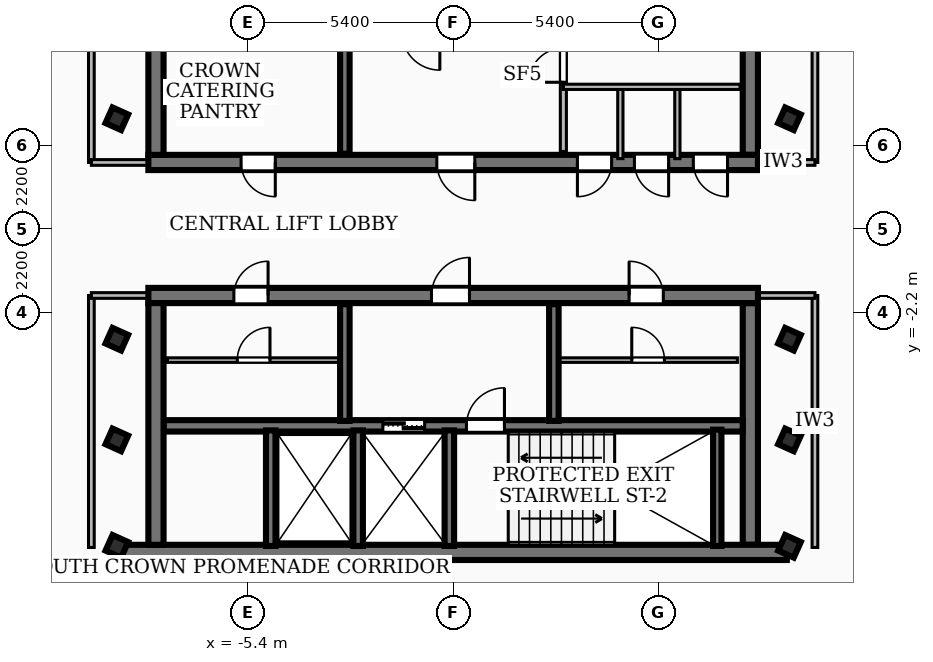
"""IFC4 building model, lengths in metres.
Left out: names, types, materials, properties, quantities, classifications, styles, units other than length and angle.
Written with IfcOpenShell. Run it as: python <this file> out.ifc"""

import sys

from ifc_helpers import new_model, si_unit, direction, frame, frame_2d, origin, origin_2d, place, context, subcontext, project, spatial, rectangle, hollow_rectangle, extrude, element, fill, save


model = new_model("IFC4")
c1 = context("Model", 3, precision=1e-05, world=origin(), true_north=direction((0.0, 1.0)))
c2 = subcontext(c1, "Body", "Model", "MODEL_VIEW")
j1 = project(units=[si_unit("LENGTHUNIT", "METRE"), si_unit("PLANEANGLEUNIT", "RADIAN")], contexts=[c1])
p1 = place(None, origin())
s1 = spatial("IfcSite", under=j1, at=p1, CompositionType="ELEMENT")
p2 = place(p1, origin())
s2 = spatial("IfcBuilding", under=s1, at=p2, CompositionType="ELEMENT")
p3 = place(p2, frame((0.0, 0.0, 297.54)))
s3 = spatial("IfcBuildingStorey", under=s2, at=p3, CompositionType="ELEMENT", Elevation=297.54)
p4 = place(p3, frame((8.02, 1.75, 0.0), z_axis=(0.0, 0.0, 1.0), x_axis=(-1.0, 0.0, 0.0)))
e1 = element("IfcWall", 1, at=p4, inside=s3, PredefinedType="SHEAR", context=c2, shape_type="SweptSolid", body=[
    extrude(rectangle(XDim=16.04, YDim=0.4, at=frame_2d((8.02, 0.0))), origin(), (0.0, 0.0, 1.0), 3.84),
])
p5 = place(p4, frame((7.45, 0.0, 0.0)))
e2 = element("IfcOpeningElement", 2, at=p5, cuts=e1, PredefinedType="OPENING", context=c2, shape_type="SweptSolid", body=[
    extrude(rectangle(XDim=1.0, YDim=2.1, at=frame_2d((0.5, 1.05))), frame((0.0, 0.21, 0.0), z_axis=(0.0, -1.0, 0.0), x_axis=(1.0, 0.0, 0.0)), (0.0, 0.0, 1.0), 0.42),
])
p6 = place(p4, frame((12.7, 0.0, 0.0)))
e3 = element("IfcOpeningElement", 3, at=p6, cuts=e1, PredefinedType="OPENING", context=c2, shape_type="SweptSolid", body=[
    extrude(rectangle(XDim=0.9, YDim=2.06, at=frame_2d((0.45, 1.03))), frame((0.0, 0.21, 0.0), z_axis=(0.0, -1.0, 0.0), x_axis=(1.0, 0.0, 0.0)), (0.0, 0.0, 1.0), 0.42),
])
p7 = place(p4, frame((3.85, 0.0, 0.0)))
e4 = element("IfcOpeningElement", 4, at=p7, cuts=e1, PredefinedType="OPENING", context=c2, shape_type="SweptSolid", body=[
    extrude(rectangle(XDim=0.9, YDim=2.06, at=frame_2d((0.45, 1.03))), frame((0.0, 0.21, 0.0), z_axis=(0.0, -1.0, 0.0), x_axis=(1.0, 0.0, 0.0)), (0.0, 0.0, 1.0), 0.42),
])
p8 = place(p4, frame((2.35, 0.0, 0.0)))
e5 = element("IfcOpeningElement", 5, at=p8, cuts=e1, PredefinedType="OPENING", context=c2, shape_type="SweptSolid", body=[
    extrude(rectangle(XDim=0.9, YDim=2.06, at=frame_2d((0.45, 1.03))), frame((0.0, 0.21, 0.0), z_axis=(0.0, -1.0, 0.0), x_axis=(1.0, 0.0, 0.0)), (0.0, 0.0, 1.0), 0.42),
])
p9 = place(p4, frame((0.8, 0.0, 0.0)))
e6 = element("IfcOpeningElement", 6, at=p9, cuts=e1, PredefinedType="OPENING", context=c2, shape_type="SweptSolid", body=[
    extrude(rectangle(XDim=0.9, YDim=2.06, at=frame_2d((0.45, 1.03))), frame((0.0, 0.21, 0.0), z_axis=(0.0, -1.0, 0.0), x_axis=(1.0, 0.0, 0.0)), (0.0, 0.0, 1.0), 0.42),
])
for number, where, z_axis, x_axis in (
    (7, (-7.82, 1.95, 0.0), (0.0, 0.0, 1.0), (0.0, 1.0, 0.0)),
    (8, (7.82, 8.31, 0.0), (0.0, 0.0, 1.0), (0.0, -1.0, 0.0)),
):
    element("IfcWall", number, at=place(p3, frame(where, z_axis=z_axis, x_axis=x_axis)), inside=s3, PredefinedType="SHEAR", context=c2, shape_type="SweptSolid", body=[
        extrude(rectangle(XDim=6.36, YDim=0.4, at=frame_2d((3.18, 0.0))), origin(), (0.0, 0.0, 1.0), 3.84),
    ])
p10 = place(p3, frame((8.78, -8.51, 0.0), z_axis=(0.0, 0.0, 1.0), x_axis=(-1.0, 0.0, 0.0)))
e9 = element("IfcWall", 9, at=p10, inside=s3, PredefinedType="SHEAR", context=c2, shape_type="SweptSolid", body=[
    extrude(rectangle(XDim=17.56, YDim=0.4, at=frame_2d((8.78, 0.0))), origin(), (0.0, 0.0, 1.0), 3.84),
])
p11 = place(p3, frame((-8.02, -1.75, 0.0), z_axis=(0.0, 0.0, 1.0), x_axis=(1.0, 0.0, 0.0)))
e10 = element("IfcWall", 10, at=p11, inside=s3, PredefinedType="SHEAR", context=c2, shape_type="SweptSolid", body=[
    extrude(rectangle(XDim=16.04, YDim=0.4, at=frame_2d((8.02, 0.0))), origin(), (0.0, 0.0, 1.0), 3.84),
])
p12 = place(p11, frame((7.45, 0.0, 0.0)))
e11 = element("IfcOpeningElement", 11, at=p12, cuts=e10, PredefinedType="OPENING", context=c2, shape_type="SweptSolid", body=[
    extrude(rectangle(XDim=1.0, YDim=2.1, at=frame_2d((0.5, 1.05))), frame((0.0, 0.21, 0.0), z_axis=(0.0, -1.0, 0.0), x_axis=(1.0, 0.0, 0.0)), (0.0, 0.0, 1.0), 0.42),
])
p13 = place(p11, frame((12.65, 0.0, 0.0)))
e12 = element("IfcOpeningElement", 12, at=p13, cuts=e10, PredefinedType="OPENING", context=c2, shape_type="SweptSolid", body=[
    extrude(rectangle(XDim=0.9, YDim=2.06, at=frame_2d((0.45, 1.03))), frame((0.0, 0.21, 0.0), z_axis=(0.0, -1.0, 0.0), x_axis=(1.0, 0.0, 0.0)), (0.0, 0.0, 1.0), 0.42),
])
p14 = place(p11, frame((2.25, 0.0, 0.0)))
e13 = element("IfcOpeningElement", 13, at=p14, cuts=e10, PredefinedType="OPENING", context=c2, shape_type="SweptSolid", body=[
    extrude(rectangle(XDim=0.9, YDim=2.06, at=frame_2d((0.45, 1.03))), frame((0.0, 0.21, 0.0), z_axis=(0.0, -1.0, 0.0), x_axis=(1.0, 0.0, 0.0)), (0.0, 0.0, 1.0), 0.42),
])
for number, where, z_axis, x_axis in (
    (14, (-7.82, -8.31, 0.0), (0.0, 0.0, 1.0), (0.0, 1.0, 0.0)),
    (15, (7.82, -1.95, 0.0), (0.0, 0.0, 1.0), (0.0, -1.0, 0.0)),
):
    element("IfcWall", number, at=place(p3, frame(where, z_axis=z_axis, x_axis=x_axis)), inside=s3, PredefinedType="SHEAR", context=c2, shape_type="SweptSolid", body=[
        extrude(rectangle(XDim=6.36, YDim=0.4, at=frame_2d((3.18, 0.0))), origin(), (0.0, 0.0, 1.0), 3.84),
    ])
p15 = place(p3, frame((-7.62, -5.18, 0.0), z_axis=(0.0, 0.0, 1.0), x_axis=(1.0, 0.0, 0.0)))
e16 = element("IfcWall", 16, at=p15, inside=s3, PredefinedType="SOLIDWALL", context=c2, shape_type="SweptSolid", body=[
    extrude(rectangle(XDim=15.24, YDim=0.3, at=frame_2d((7.62, 0.0))), origin(), (0.0, 0.0, 1.0), 3.84),
])
p16 = place(p15, frame((5.77, 0.0, 0.0)))
e17 = element("IfcOpeningElement", 17, at=p16, cuts=e16, PredefinedType="OPENING", context=c2, shape_type="SweptSolid", body=[
    extrude(rectangle(XDim=1.1, YDim=2.15, at=frame_2d((0.55, 1.075))), frame((0.0, 0.16, 0.0), z_axis=(0.0, -1.0, 0.0), x_axis=(1.0, 0.0, 0.0)), (0.0, 0.0, 1.0), 0.32),
])
p17 = place(p15, frame((7.97, 0.0, 0.0)))
e18 = element("IfcOpeningElement", 18, at=p17, cuts=e16, PredefinedType="OPENING", context=c2, shape_type="SweptSolid", body=[
    extrude(rectangle(XDim=1.0, YDim=2.1, at=frame_2d((0.5, 1.05))), frame((0.0, 0.16, 0.0), z_axis=(0.0, -1.0, 0.0), x_axis=(1.0, 0.0, 0.0)), (0.0, 0.0, 1.0), 0.32),
])
p18 = place(p3, frame((6.95, -8.34, 0.0), z_axis=(0.0, 0.0, 1.0), x_axis=(0.0, 1.0, 0.0)))
e19 = element("IfcWall", 19, at=p18, inside=s3, PredefinedType="SOLIDWALL", context=c2, shape_type="SweptSolid", body=[
    extrude(rectangle(XDim=3.06, YDim=0.22, at=frame_2d((1.53, 0.0))), origin(), (0.0, 0.0, 1.0), 3.84),
])
p19 = place(p3, frame((-2.85, 1.98, 0.0), z_axis=(0.0, 0.0, 1.0), x_axis=(0.0, 1.0, 0.0)))
e20 = element("IfcWall", 20, at=p19, inside=s3, PredefinedType="SOLIDWALL", context=c2, shape_type="SweptSolid", body=[
    extrude(rectangle(XDim=3.07, YDim=0.25, at=frame_2d((1.535, 0.0))), origin(), (0.0, 0.0, 1.0), 3.84),
])
for number, where, z_axis, x_axis in (
    (21, (-0.1, -8.34, 0.0), (0.0, 0.0, 1.0), (0.0, 1.0, 0.0)),
    (22, (-2.5, -8.34, 0.0), (0.0, 0.0, 1.0), (0.0, 1.0, 0.0)),
    (23, (-4.8, -8.34, 0.0), (0.0, 0.0, 1.0), (0.0, 1.0, 0.0)),
):
    element("IfcWall", number, at=place(p3, frame(where, z_axis=z_axis, x_axis=x_axis)), inside=s3, PredefinedType="SOLIDWALL", context=c2, shape_type="SweptSolid", body=[
        extrude(rectangle(XDim=3.04, YDim=0.25, at=frame_2d((1.52, 0.0))), origin(), (0.0, 0.0, 1.0), 3.84),
    ])
for number, where, z_axis, x_axis in (
    (24, (-2.85, -5.05, 0.0), (0.0, 0.0, 1.0), (0.0, 1.0, 0.0)),
    (25, (2.65, -5.05, 0.0), (0.0, 0.0, 1.0), (0.0, 1.0, 0.0)),
):
    element("IfcWall", number, at=place(p3, frame(where, z_axis=z_axis, x_axis=x_axis)), inside=s3, PredefinedType="SOLIDWALL", context=c2, shape_type="SweptSolid", body=[
        extrude(rectangle(XDim=3.07, YDim=0.25, at=frame_2d((1.535, 0.0))), origin(), (0.0, 0.0, 1.0), 3.84),
    ])
for number, where, z_axis, x_axis in (
    (26, (-8.85, -5.55, 0.0), (0.0, 0.0, 1.0), (0.411, 0.912, 0.0)),
    (27, (-8.85, -2.9, 0.0), (0.0, 0.0, 1.0), (0.411, 0.912, 0.0)),
    (28, (-8.85, 2.9, 0.0), (0.0, 0.0, 1.0), (0.411, 0.912, 0.0)),
    (29, (8.85, -5.55, 0.0), (0.0, 0.0, 1.0), (0.411, 0.912, 0.0)),
    (30, (8.85, -2.9, 0.0), (0.0, 0.0, 1.0), (0.411, 0.912, 0.0)),
    (31, (8.85, 2.9, 0.0), (0.0, 0.0, 1.0), (0.411, 0.912, 0.0)),
    (32, (8.85, -8.35, 0.0), (0.0, 0.0, 1.0), (0.411, 0.912, 0.0)),
    (33, (-8.85, -8.35, 0.0), (0.0, 0.0, 1.0), (0.411, 0.912, 0.0)),
):
    element("IfcColumn", number, at=place(p3, frame(where, z_axis=z_axis, x_axis=x_axis)), inside=s3, PredefinedType="COLUMN", context=c2, shape_type="SweptSolid", body=[
        extrude(hollow_rectangle(XDim=0.45, YDim=0.45, WallThickness=0.022, at=origin_2d()), origin(), (0.0, 0.0, 1.0), 4.14),
    ])
p20 = place(p3, frame((6.434, -18.744, 0.0), z_axis=(0.0, 0.0, 1.0), x_axis=(-0.911837784954, 0.410550671574, 0.0)))
e34 = element("IfcWall", 34, at=p20, inside=s3, PredefinedType="SOLIDWALL", context=c2, shape_type="SweptSolid", body=[
    extrude(rectangle(XDim=27.125, YDim=0.2, at=frame_2d((13.562, 0.0))), origin(), (0.0, 0.0, 1.0), 3.84),
])
p21 = place(p3, frame((2.9, 2.04, 0.0), z_axis=(0.0, 0.0, 1.0), x_axis=(0.0, 1.0, 0.0)))
e35 = element("IfcWall", 35, at=p21, inside=s3, PredefinedType="PARTITIONING", context=c2, shape_type="SweptSolid", body=[
    extrude(rectangle(XDim=2.94, YDim=0.16, at=frame_2d((1.47, 0.0))), origin(), (0.0, 0.0, 1.0), 3.07),
])
p22 = place(p21, frame((1.82, 0.0, 0.0)))
e36 = element("IfcOpeningElement", 36, at=p22, cuts=e35, PredefinedType="OPENING", context=c2, shape_type="SweptSolid", body=[
    extrude(rectangle(XDim=0.9, YDim=2.06, at=frame_2d((0.45, 1.03))), frame((0.0, 0.09, 0.0), z_axis=(0.0, -1.0, 0.0), x_axis=(1.0, 0.0, 0.0)), (0.0, 0.0, 1.0), 0.18),
])
p23 = place(p3, frame((2.9, 3.74, 0.0), z_axis=(0.0, 0.0, 1.0), x_axis=(1.0, 0.0, 0.0)))
e37 = element("IfcWall", 37, at=p23, inside=s3, PredefinedType="PARTITIONING", context=c2, shape_type="SweptSolid", body=[
    extrude(rectangle(XDim=4.65, YDim=0.138, at=frame_2d((2.325, 0.0))), origin(), (0.0, 0.0, 1.0), 3.84),
])
p24 = place(p3, frame((2.8, -3.45, 0.0), z_axis=(0.0, 0.0, 1.0), x_axis=(1.0, 0.0, 0.0)))
e38 = element("IfcWall", 38, at=p24, inside=s3, PredefinedType="PARTITIONING", context=c2, shape_type="SweptSolid", body=[
    extrude(rectangle(XDim=4.68, YDim=0.12, at=frame_2d((2.34, 0.0))), origin(), (0.0, 0.0, 1.0), 3.84),
])
p25 = place(p24, frame((1.9, 0.0, 0.0)))
e39 = element("IfcOpeningElement", 39, at=p25, cuts=e38, PredefinedType="OPENING", context=c2, shape_type="SweptSolid", body=[
    extrude(rectangle(XDim=0.86, YDim=2.04, at=frame_2d((0.43, 1.02))), frame((0.0, 0.07, 0.0), z_axis=(0.0, -1.0, 0.0), x_axis=(1.0, 0.0, 0.0)), (0.0, 0.0, 1.0), 0.14),
])
p26 = place(p3, frame((-7.52, -3.45, 0.0), z_axis=(0.0, 0.0, 1.0), x_axis=(1.0, 0.0, 0.0)))
e40 = element("IfcWall", 40, at=p26, inside=s3, PredefinedType="PARTITIONING", context=c2, shape_type="SweptSolid", body=[
    extrude(rectangle(XDim=4.54, YDim=0.12, at=frame_2d((2.27, 0.0))), origin(), (0.0, 0.0, 1.0), 3.21),
])
p27 = place(p26, frame((1.84, 0.0, 0.0)))
e41 = element("IfcOpeningElement", 41, at=p27, cuts=e40, PredefinedType="OPENING", context=c2, shape_type="SweptSolid", body=[
    extrude(rectangle(XDim=0.86, YDim=2.04, at=frame_2d((0.43, 1.02))), frame((0.0, 0.07, 0.0), z_axis=(0.0, -1.0, 0.0), x_axis=(1.0, 0.0, 0.0)), (0.0, 0.0, 1.0), 0.14),
])
for number, where, z_axis, x_axis in (
    (42, (4.4, 1.85, 0.0), (0.0, 0.0, 1.0), (0.0, 1.0, 0.0)),
    (43, (5.9, 1.85, 0.0), (0.0, 0.0, 1.0), (0.0, 1.0, 0.0)),
):
    element("IfcWall", number, at=place(p3, frame(where, z_axis=z_axis, x_axis=x_axis)), inside=s3, PredefinedType="PARTITIONING", context=c2, shape_type="SweptSolid", body=[
        extrude(rectangle(XDim=1.89, YDim=0.138, at=frame_2d((0.945, 0.0))), origin(), (0.0, 0.0, 1.0), 3.07),
    ])
p28 = place(p3, frame((-9.52, 1.75, 0.0), z_axis=(0.0, 0.0, 1.0), x_axis=(0.0, 1.0, 0.0)))
e44 = element("IfcWall", 44, at=p28, inside=s3, PredefinedType="PARTITIONING", context=c2, shape_type="SweptSolid", body=[
    extrude(rectangle(XDim=6.63, YDim=0.15, at=frame_2d((3.315, 0.0))), origin(), (0.0, 0.0, 1.0), 3.21),
])
p29 = place(p3, frame((-7.85, 1.75, 0.0), z_axis=(0.0, 0.0, 1.0), x_axis=(-1.0, 0.0, 0.0)))
e45 = element("IfcWall", 45, at=p29, inside=s3, PredefinedType="PARTITIONING", context=c2, shape_type="SweptSolid", body=[
    extrude(rectangle(XDim=1.67, YDim=0.15, at=frame_2d((0.835, 0.0))), origin(), (0.0, 0.0, 1.0), 3.07),
])
p30 = place(p3, frame((-9.52, -8.38, 0.0), z_axis=(0.0, 0.0, 1.0), x_axis=(0.0, 1.0, 0.0)))
e46 = element("IfcWall", 46, at=p30, inside=s3, PredefinedType="PARTITIONING", context=c2, shape_type="SweptSolid", body=[
    extrude(rectangle(XDim=6.63, YDim=0.15, at=frame_2d((3.315, 0.0))), origin(), (0.0, 0.0, 1.0), 3.84),
])
p31 = place(p3, frame((-7.85, -1.75, 0.0), z_axis=(0.0, 0.0, 1.0), x_axis=(-1.0, 0.0, 0.0)))
e47 = element("IfcWall", 47, at=p31, inside=s3, PredefinedType="PARTITIONING", context=c2, shape_type="SweptSolid", body=[
    extrude(rectangle(XDim=1.67, YDim=0.15, at=frame_2d((0.835, 0.0))), origin(), (0.0, 0.0, 1.0), 3.07),
])
p32 = place(p3, frame((9.52, 1.75, 0.0), z_axis=(0.0, 0.0, 1.0), x_axis=(0.0, 1.0, 0.0)))
e48 = element("IfcWall", 48, at=p32, inside=s3, PredefinedType="PARTITIONING", context=c2, shape_type="SweptSolid", body=[
    extrude(rectangle(XDim=6.63, YDim=0.15, at=frame_2d((3.315, 0.0))), origin(), (0.0, 0.0, 1.0), 3.84),
])
p33 = place(p3, frame((7.85, 1.75, 0.0), z_axis=(0.0, 0.0, 1.0), x_axis=(1.0, 0.0, 0.0)))
e49 = element("IfcWall", 49, at=p33, inside=s3, PredefinedType="PARTITIONING", context=c2, shape_type="SweptSolid", body=[
    extrude(rectangle(XDim=1.67, YDim=0.15, at=frame_2d((0.835, 0.0))), origin(), (0.0, 0.0, 1.0), 3.07),
])
p34 = place(p3, frame((9.52, -8.38, 0.0), z_axis=(0.0, 0.0, 1.0), x_axis=(0.0, 1.0, 0.0)))
e50 = element("IfcWall", 50, at=p34, inside=s3, PredefinedType="PARTITIONING", context=c2, shape_type="SweptSolid", body=[
    extrude(rectangle(XDim=6.63, YDim=0.15, at=frame_2d((3.315, 0.0))), origin(), (0.0, 0.0, 1.0), 3.21),
])
p35 = place(p3, frame((7.85, -1.75, 0.0), z_axis=(0.0, 0.0, 1.0), x_axis=(1.0, 0.0, 0.0)))
e51 = element("IfcWall", 51, at=p35, inside=s3, PredefinedType="PARTITIONING", context=c2, shape_type="SweptSolid", body=[
    extrude(rectangle(XDim=1.67, YDim=0.15, at=frame_2d((0.835, 0.0))), origin(), (0.0, 0.0, 1.0), 3.07),
])
p36 = place(p5, origin())
e52 = element("IfcDoor", 52, at=p36, inside=s3, OperationType="SINGLE_SWING_LEFT", PredefinedType="DOOR", context=c2, shape_type="SweptSolid", body=[
    extrude(rectangle(XDim=1.0, YDim=2.1, at=frame_2d((0.5, 1.05))), frame((0.0, 0.025, 0.0), z_axis=(0.0, -1.0, 0.0), x_axis=(1.0, 0.0, 0.0)), (0.0, 0.0, 1.0), 0.05),
])
fill(e2, e52)
p37 = place(p12, origin())
e53 = element("IfcDoor", 53, at=p37, inside=s3, OperationType="SINGLE_SWING_RIGHT", PredefinedType="DOOR", context=c2, shape_type="SweptSolid", body=[
    extrude(rectangle(XDim=1.0, YDim=2.1, at=frame_2d((0.5, 1.05))), frame((0.0, 0.025, 0.0), z_axis=(0.0, -1.0, 0.0), x_axis=(1.0, 0.0, 0.0)), (0.0, 0.0, 1.0), 0.05),
])
fill(e11, e53)
p38 = place(p16, origin())
e54 = element("IfcDoor", 54, at=p38, inside=s3, OperationType="DOUBLE_DOOR_SLIDING", PredefinedType="DOOR", context=c2, shape_type="SweptSolid", body=[
    extrude(rectangle(XDim=1.1, YDim=2.15, at=frame_2d((0.55, 1.075))), frame((0.0, 0.025, 0.0), z_axis=(0.0, -1.0, 0.0), x_axis=(1.0, 0.0, 0.0)), (0.0, 0.0, 1.0), 0.05),
])
fill(e17, e54)
p39 = place(p17, origin())
e55 = element("IfcDoor", 55, at=p39, inside=s3, OperationType="SINGLE_SWING_RIGHT", PredefinedType="DOOR", context=c2, shape_type="SweptSolid", body=[
    extrude(rectangle(XDim=1.0, YDim=2.1, at=frame_2d((0.5, 1.05))), frame((0.0, 0.025, 0.0), z_axis=(0.0, -1.0, 0.0), x_axis=(1.0, 0.0, 0.0)), (0.0, 0.0, 1.0), 0.05),
])
fill(e18, e55)
p40 = place(p6, origin())
e56 = element("IfcDoor", 56, at=p40, inside=s3, OperationType="SINGLE_SWING_LEFT", PredefinedType="DOOR", context=c2, shape_type="SweptSolid", body=[
    extrude(rectangle(XDim=0.9, YDim=2.06, at=frame_2d((0.45, 1.03))), frame((0.0, 0.025, 0.0), z_axis=(0.0, -1.0, 0.0), x_axis=(1.0, 0.0, 0.0)), (0.0, 0.0, 1.0), 0.05),
])
fill(e3, e56)
p41 = place(p13, origin())
e57 = element("IfcDoor", 57, at=p41, inside=s3, OperationType="SINGLE_SWING_LEFT", PredefinedType="DOOR", context=c2, shape_type="SweptSolid", body=[
    extrude(rectangle(XDim=0.9, YDim=2.06, at=frame_2d((0.45, 1.03))), frame((0.0, 0.025, 0.0), z_axis=(0.0, -1.0, 0.0), x_axis=(1.0, 0.0, 0.0)), (0.0, 0.0, 1.0), 0.05),
])
fill(e12, e57)
p42 = place(p14, origin())
e58 = element("IfcDoor", 58, at=p42, inside=s3, OperationType="SINGLE_SWING_RIGHT", PredefinedType="DOOR", context=c2, shape_type="SweptSolid", body=[
    extrude(rectangle(XDim=0.9, YDim=2.06, at=frame_2d((0.45, 1.03))), frame((0.0, 0.025, 0.0), z_axis=(0.0, -1.0, 0.0), x_axis=(1.0, 0.0, 0.0)), (0.0, 0.0, 1.0), 0.05),
])
fill(e13, e58)
p43 = place(p7, origin())
e59 = element("IfcDoor", 59, at=p43, inside=s3, OperationType="SINGLE_SWING_RIGHT", PredefinedType="DOOR", context=c2, shape_type="SweptSolid", body=[
    extrude(rectangle(XDim=0.9, YDim=2.06, at=frame_2d((0.45, 1.03))), frame((0.0, 0.025, 0.0), z_axis=(0.0, -1.0, 0.0), x_axis=(1.0, 0.0, 0.0)), (0.0, 0.0, 1.0), 0.05),
])
fill(e4, e59)
p44 = place(p8, origin())
e60 = element("IfcDoor", 60, at=p44, inside=s3, OperationType="SINGLE_SWING_LEFT", PredefinedType="DOOR", context=c2, shape_type="SweptSolid", body=[
    extrude(rectangle(XDim=0.9, YDim=2.06, at=frame_2d((0.45, 1.03))), frame((0.0, 0.025, 0.0), z_axis=(0.0, -1.0, 0.0), x_axis=(1.0, 0.0, 0.0)), (0.0, 0.0, 1.0), 0.05),
])
fill(e5, e60)
p45 = place(p9, origin())
e61 = element("IfcDoor", 61, at=p45, inside=s3, OperationType="SINGLE_SWING_LEFT", PredefinedType="DOOR", context=c2, shape_type="SweptSolid", body=[
    extrude(rectangle(XDim=0.9, YDim=2.06, at=frame_2d((0.45, 1.03))), frame((0.0, 0.025, 0.0), z_axis=(0.0, -1.0, 0.0), x_axis=(1.0, 0.0, 0.0)), (0.0, 0.0, 1.0), 0.05),
])
fill(e6, e61)
p46 = place(p22, origin())
e62 = element("IfcDoor", 62, at=p46, inside=s3, OperationType="SINGLE_SWING_LEFT", PredefinedType="DOOR", context=c2, shape_type="SweptSolid", body=[
    extrude(rectangle(XDim=0.9, YDim=2.06, at=frame_2d((0.45, 1.03))), frame((0.0, 0.025, 0.0), z_axis=(0.0, -1.0, 0.0), x_axis=(1.0, 0.0, 0.0)), (0.0, 0.0, 1.0), 0.05),
])
fill(e36, e62)
p47 = place(p25, origin())
e63 = element("IfcDoor", 63, at=p47, inside=s3, OperationType="SINGLE_SWING_LEFT", PredefinedType="DOOR", context=c2, shape_type="SweptSolid", body=[
    extrude(rectangle(XDim=0.86, YDim=2.04, at=frame_2d((0.43, 1.02))), frame((0.0, 0.025, 0.0), z_axis=(0.0, -1.0, 0.0), x_axis=(1.0, 0.0, 0.0)), (0.0, 0.0, 1.0), 0.05),
])
fill(e39, e63)
p48 = place(p27, origin())
e64 = element("IfcDoor", 64, at=p48, inside=s3, OperationType="SINGLE_SWING_RIGHT", PredefinedType="DOOR", context=c2, shape_type="SweptSolid", body=[
    extrude(rectangle(XDim=0.86, YDim=2.04, at=frame_2d((0.43, 1.02))), frame((0.0, 0.025, 0.0), z_axis=(0.0, -1.0, 0.0), x_axis=(1.0, 0.0, 0.0)), (0.0, 0.0, 1.0), 0.05),
])
fill(e41, e64)
save(model, sys.argv[1])
